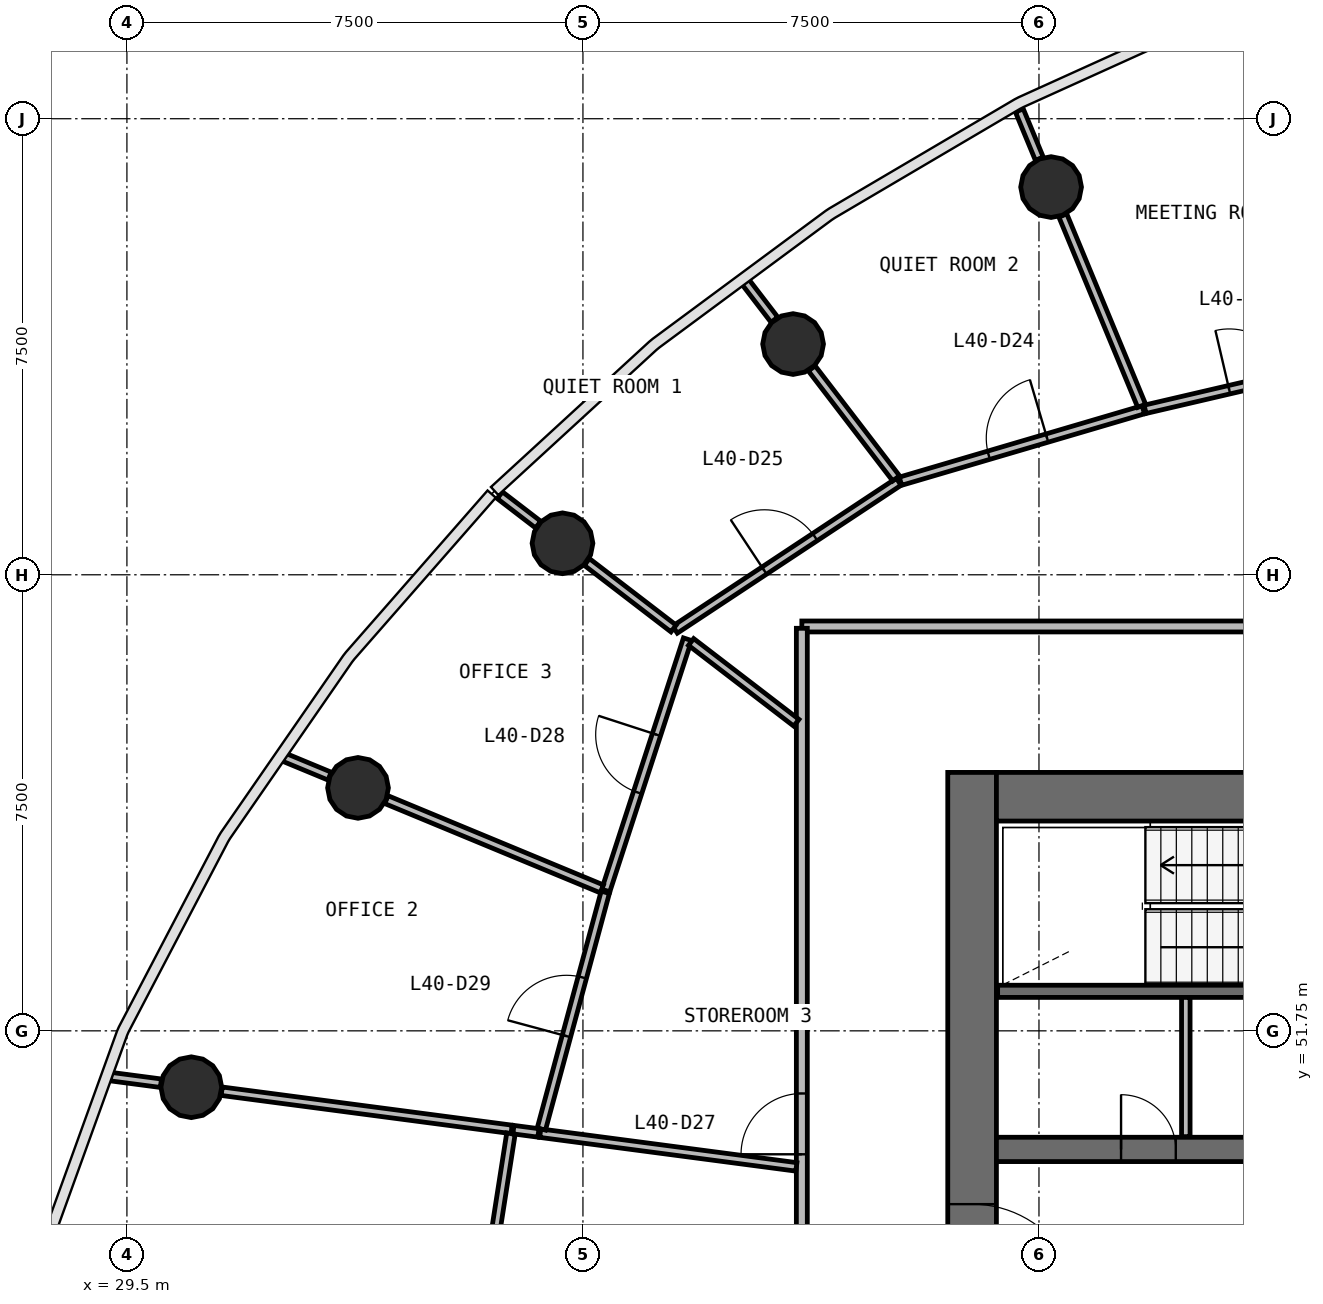
"""IFC4 building model, lengths in metres.
Left out: names, types, materials, properties, quantities, classifications, styles, units other than length and angle.
Written with IfcOpenShell. Run it as: python <this file> out.ifc"""

import sys

from ifc_helpers import new_model, si_unit, direction, frame, frame_2d, origin, origin_2d, place, context, subcontext, project, spatial, rectangle, circle, extrude, source, transform, mapped, element, fill, save


model = new_model("IFC4")
c1 = context("Model", 3, precision=1e-05, world=origin(), true_north=direction((0.0, 1.0)))
c2 = subcontext(c1, "Body", "Model", "MODEL_VIEW")
j1 = project(units=[si_unit("LENGTHUNIT", "METRE"), si_unit("PLANEANGLEUNIT", "RADIAN")], contexts=[c1])
p1 = place(None, origin())
s1 = spatial("IfcSite", under=j1, at=p1, CompositionType="ELEMENT")
p2 = place(p1, origin())
s2 = spatial("IfcBuilding", under=s1, at=p2, CompositionType="ELEMENT")
p3 = place(p2, frame((0.0, 0.0, 168.2)))
s3 = spatial("IfcBuildingStorey", under=s2, at=p3, CompositionType="ELEMENT", Elevation=168.2)
p4 = place(p3, frame((43.4, 56.0, 0.0), z_axis=(0.0, 0.0, 1.0), x_axis=(0.0, -1.0, 0.0)))
e1 = element("IfcWall", 1, at=p4, inside=s3, PredefinedType="SHEAR", context=c2, shape_type="SweptSolid", body=[
    extrude(rectangle(XDim=16.0, YDim=0.8, at=frame_2d((8.0, 0.0))), origin(), (0.0, 0.0, 1.0), 3.9),
])
p5 = place(p4, frame((7.1, 0.0, 0.0)))
e2 = element("IfcOpeningElement", 2, at=p5, cuts=e1, PredefinedType="OPENING", context=c2, shape_type="SweptSolid", body=[
    extrude(rectangle(XDim=1.8, YDim=2.1, at=frame_2d((0.9, 1.05))), frame((0.0, 0.41, 0.0), z_axis=(0.0, -1.0, 0.0), x_axis=(1.0, 0.0, 0.0)), (0.0, 0.0, 1.0), 0.82),
])
p6 = place(p3, frame((60.2, 55.6, 0.0), z_axis=(0.0, 0.0, 1.0), x_axis=(-1.0, 0.0, 0.0)))
e3 = element("IfcWall", 3, at=p6, inside=s3, PredefinedType="SHEAR", context=c2, shape_type="SweptSolid", body=[
    extrude(rectangle(XDim=16.4, YDim=0.8, at=frame_2d((8.2, 0.0))), origin(), (0.0, 0.0, 1.0), 3.9),
])
p7 = place(p6, frame((0.2, 0.0, 0.0)))
e4 = element("IfcOpeningElement", 4, at=p7, cuts=e3, PredefinedType="OPENING", context=c2, shape_type="SweptSolid", body=[
    extrude(rectangle(XDim=1.1, YDim=2.1, at=frame_2d((0.55, 1.05))), frame((0.0, 0.41, 0.0), z_axis=(0.0, -1.0, 0.0), x_axis=(1.0, 0.0, 0.0)), (0.0, 0.0, 1.0), 0.82),
])
p8 = place(p6, frame((10.1, 0.0, 0.0)))
e5 = element("IfcOpeningElement", 5, at=p8, cuts=e3, PredefinedType="OPENING", context=c2, shape_type="SweptSolid", body=[
    extrude(rectangle(XDim=1.2, YDim=2.1, at=frame_2d((0.6, 1.05))), frame((0.0, 0.41, 0.0), z_axis=(0.0, -1.0, 0.0), x_axis=(1.0, 0.0, 0.0)), (0.0, 0.0, 1.0), 0.82),
])
p9 = place(p6, frame((7.05, 0.0, 0.0)))
e6 = element("IfcOpeningElement", 6, at=p9, cuts=e3, PredefinedType="OPENING", context=c2, shape_type="SweptSolid", body=[
    extrude(rectangle(XDim=1.1, YDim=2.1, at=frame_2d((0.55, 1.05))), frame((0.0, 0.41, 0.0), z_axis=(0.0, -1.0, 0.0), x_axis=(1.0, 0.0, 0.0)), (0.0, 0.0, 1.0), 0.82),
])
p10 = place(p3, frame((43.8, 49.8, 0.0), z_axis=(0.0, 0.0, 1.0), x_axis=(1.0, 0.0, 0.0)))
e7 = element("IfcWall", 7, at=p10, inside=s3, PredefinedType="SHEAR", context=c2, shape_type="SweptSolid", body=[
    extrude(rectangle(XDim=16.4, YDim=0.4, at=frame_2d((8.2, 0.0))), origin(), (0.0, 0.0, 1.0), 3.9),
])
p11 = place(p10, frame((9.6, 0.0, 0.0)))
e8 = element("IfcOpeningElement", 8, at=p11, cuts=e7, PredefinedType="OPENING", context=c2, shape_type="SweptSolid", body=[
    extrude(rectangle(XDim=1.1, YDim=2.1, at=frame_2d((0.55, 1.05))), frame((0.0, 0.21, 0.0), z_axis=(0.0, -1.0, 0.0), x_axis=(1.0, 0.0, 0.0)), (0.0, 0.0, 1.0), 0.42),
])
p12 = place(p10, frame((12.1, 0.0, 0.0)))
e9 = element("IfcOpeningElement", 9, at=p12, cuts=e7, PredefinedType="OPENING", context=c2, shape_type="SweptSolid", body=[
    extrude(rectangle(XDim=1.1, YDim=2.1, at=frame_2d((0.55, 1.05))), frame((0.0, 0.21, 0.0), z_axis=(0.0, -1.0, 0.0), x_axis=(1.0, 0.0, 0.0)), (0.0, 0.0, 1.0), 0.42),
])
p13 = place(p10, frame((14.6, 0.0, 0.0)))
e10 = element("IfcOpeningElement", 10, at=p13, cuts=e7, PredefinedType="OPENING", context=c2, shape_type="SweptSolid", body=[
    extrude(rectangle(XDim=1.1, YDim=2.1, at=frame_2d((0.55, 1.05))), frame((0.0, 0.21, 0.0), z_axis=(0.0, -1.0, 0.0), x_axis=(1.0, 0.0, 0.0)), (0.0, 0.0, 1.0), 0.42),
])
p14 = place(p10, frame((2.05, 0.0, 0.0)))
e11 = element("IfcOpeningElement", 11, at=p14, cuts=e7, PredefinedType="OPENING", context=c2, shape_type="SweptSolid", body=[
    extrude(rectangle(XDim=0.9, YDim=2.1, at=frame_2d((0.45, 1.05))), frame((0.0, 0.21, 0.0), z_axis=(0.0, -1.0, 0.0), x_axis=(1.0, 0.0, 0.0)), (0.0, 0.0, 1.0), 0.42),
])
p15 = place(p10, frame((5.05, 0.0, 0.0)))
e12 = element("IfcOpeningElement", 12, at=p15, cuts=e7, PredefinedType="OPENING", context=c2, shape_type="SweptSolid", body=[
    extrude(rectangle(XDim=0.9, YDim=2.1, at=frame_2d((0.45, 1.05))), frame((0.0, 0.21, 0.0), z_axis=(0.0, -1.0, 0.0), x_axis=(1.0, 0.0, 0.0)), (0.0, 0.0, 1.0), 0.42),
])
p16 = place(p10, frame((7.65, 0.0, 0.0)))
e13 = element("IfcOpeningElement", 13, at=p16, cuts=e7, PredefinedType="OPENING", context=c2, shape_type="SweptSolid", body=[
    extrude(rectangle(XDim=0.9, YDim=2.1, at=frame_2d((0.45, 1.05))), frame((0.0, 0.21, 0.0), z_axis=(0.0, -1.0, 0.0), x_axis=(1.0, 0.0, 0.0)), (0.0, 0.0, 1.0), 0.42),
])
m1 = source(origin(), c2, "Body", "SweptSolid", [
    extrude(circle(Radius=0.5, at=origin_2d()), origin(), (0.0, 0.0, 1.0), 3.9),
])
for number, where, z_axis, x_axis in (
    (14, (44.699, 65.626, 0.0), (0.0, 0.0, 1.0), (1.0, 0.0, 0.0)),
    (15, (40.456, 63.044, 0.0), (0.0, 0.0, 1.0), (1.0, 0.0, 0.0)),
    (16, (36.664, 59.768, 0.0), (0.0, 0.0, 1.0), (1.0, 0.0, 0.0)),
    (17, (33.301, 55.746, 0.0), (0.0, 0.0, 1.0), (1.0, 0.0, 0.0)),
    (18, (30.559, 50.823, 0.0), (0.0, 0.0, 1.0), (1.0, 0.0, 0.0)),
):
    element("IfcColumn", number, at=place(p3, frame(where, z_axis=z_axis, x_axis=x_axis)), inside=s3, PredefinedType="COLUMN", context=c2, shape_type="MappedRepresentation", body=[
        mapped(m1, transform((0.0, 0.0, 0.0), scale=1.0)),
    ])
p17 = place(p3, frame((43.82, 52.4, 0.0), z_axis=(0.0, 0.0, 1.0), x_axis=(1.0, 0.0, 0.0)))
e19 = element("IfcWall", 19, at=p17, inside=s3, PredefinedType="SOLIDWALL", context=c2, shape_type="SweptSolid", body=[
    extrude(rectangle(XDim=6.58, YDim=0.2, at=frame_2d((3.29, 0.0))), origin(), (0.0, 0.0, 1.0), 3.58),
])
p18 = place(p3, frame((40.6, 58.4, 0.0), z_axis=(0.0, 0.0, 1.0), x_axis=(1.0, 0.0, 0.0)))
e20 = element("IfcWall", 20, at=p18, inside=s3, PredefinedType="PARTITIONING", context=c2, shape_type="SweptSolid", body=[
    extrude(rectangle(XDim=22.8, YDim=0.18, at=frame_2d((11.4, 0.0))), origin(), (0.0, 0.0, 1.0), 2.88),
])
p19 = place(p18, frame((16.05, 0.0, 0.0)))
e21 = element("IfcOpeningElement", 21, at=p19, cuts=e20, PredefinedType="OPENING", context=c2, shape_type="SweptSolid", body=[
    extrude(rectangle(XDim=0.9, YDim=2.1, at=frame_2d((0.45, 1.05))), frame((0.0, 0.1, 0.0), z_axis=(0.0, -1.0, 0.0), x_axis=(1.0, 0.0, 0.0)), (0.0, 0.0, 1.0), 0.2),
])
p20 = place(p18, frame((13.05, 0.0, 0.0)))
e22 = element("IfcOpeningElement", 22, at=p20, cuts=e20, PredefinedType="OPENING", context=c2, shape_type="SweptSolid", body=[
    extrude(rectangle(XDim=0.9, YDim=2.1, at=frame_2d((0.45, 1.05))), frame((0.0, 0.1, 0.0), z_axis=(0.0, -1.0, 0.0), x_axis=(1.0, 0.0, 0.0)), (0.0, 0.0, 1.0), 0.2),
])
p21 = place(p18, frame((10.95, 0.0, 0.0)))
e23 = element("IfcOpeningElement", 23, at=p21, cuts=e20, PredefinedType="OPENING", context=c2, shape_type="SweptSolid", body=[
    extrude(rectangle(XDim=1.0, YDim=2.1, at=frame_2d((0.5, 1.05))), frame((0.0, 0.1, 0.0), z_axis=(0.0, -1.0, 0.0), x_axis=(1.0, 0.0, 0.0)), (0.0, 0.0, 1.0), 0.2),
])
p22 = place(p18, frame((19.95, 0.0, 0.0)))
e24 = element("IfcOpeningElement", 24, at=p22, cuts=e20, PredefinedType="OPENING", context=c2, shape_type="SweptSolid", body=[
    extrude(rectangle(XDim=1.0, YDim=2.1, at=frame_2d((0.5, 1.05))), frame((0.0, 0.1, 0.0), z_axis=(0.0, -1.0, 0.0), x_axis=(1.0, 0.0, 0.0)), (0.0, 0.0, 1.0), 0.2),
])
p23 = place(p3, frame((40.6, 37.63, 0.0), z_axis=(0.0, 0.0, 1.0), x_axis=(0.0, 1.0, 0.0)))
e25 = element("IfcWall", 25, at=p23, inside=s3, PredefinedType="PARTITIONING", context=c2, shape_type="SweptSolid", body=[
    extrude(rectangle(XDim=20.74, YDim=0.18, at=frame_2d((10.37, 0.0))), origin(), (0.0, 0.0, 1.0), 2.88),
])
p24 = place(p23, frame((12.09, 0.0, 0.0)))
e26 = element("IfcOpeningElement", 26, at=p24, cuts=e25, PredefinedType="OPENING", context=c2, shape_type="SweptSolid", body=[
    extrude(rectangle(XDim=1.0, YDim=2.1, at=frame_2d((0.5, 1.05))), frame((0.0, 0.1, 0.0), z_axis=(0.0, -1.0, 0.0), x_axis=(1.0, 0.0, 0.0)), (0.0, 0.0, 1.0), 0.2),
])
p25 = place(p23, frame((9.89, 0.0, 0.0)))
e27 = element("IfcOpeningElement", 27, at=p25, cuts=e25, PredefinedType="OPENING", context=c2, shape_type="SweptSolid", body=[
    extrude(rectangle(XDim=1.0, YDim=2.1, at=frame_2d((0.5, 1.05))), frame((0.0, 0.1, 0.0), z_axis=(0.0, -1.0, 0.0), x_axis=(1.0, 0.0, 0.0)), (0.0, 0.0, 1.0), 0.2),
])
p26 = place(p3, frame((35.827, 50.129, 0.0), z_axis=(0.0, 0.0, 1.0), x_axis=(-0.991450839052, 0.130480779208, 0.0)))
e28 = element("IfcWall", 28, at=p26, inside=s3, PredefinedType="PARTITIONING", context=c2, shape_type="SweptSolid", body=[
    extrude(rectangle(XDim=4.809, YDim=0.14, at=frame_2d((2.404, 0.0))), origin(), (0.0, 0.0, 1.0), 2.88),
])
p27 = place(p3, frame((38.514, 58.348, 0.0), z_axis=(0.0, 0.0, 1.0), x_axis=(0.834249384929, 0.551387308292, 0.0)))
e29 = element("IfcWall", 29, at=p27, inside=s3, PredefinedType="PARTITIONING", context=c2, shape_type="SweptSolid", body=[
    extrude(rectangle(XDim=4.41, YDim=0.14, at=frame_2d((2.205, 0.0))), origin(), (0.0, 0.0, 1.0), 2.88),
])
p28 = place(p27, frame((1.76, 0.0, 0.0)))
e30 = element("IfcOpeningElement", 30, at=p28, cuts=e29, PredefinedType="OPENING", context=c2, shape_type="SweptSolid", body=[
    extrude(rectangle(XDim=1.0, YDim=2.1, at=frame_2d((0.5, 1.05))), frame((0.0, 0.08, 0.0), z_axis=(0.0, -1.0, 0.0), x_axis=(1.0, 0.0, 0.0)), (0.0, 0.0, 1.0), 0.16),
])
p29 = place(p3, frame((35.152, 45.811, 0.0), z_axis=(0.0, 0.0, 1.0), x_axis=(0.154356099054, 0.988015280593, 0.0)))
e31 = element("IfcWall", 31, at=p29, inside=s3, PredefinedType="PARTITIONING", context=c2, shape_type="SweptSolid", body=[
    extrude(rectangle(XDim=4.301, YDim=0.14, at=frame_2d((2.15, 0.0))), origin(), (0.0, 0.0, 1.0), 2.88),
])
p30 = place(p29, frame((1.651, 0.0, 0.0)))
e32 = element("IfcOpeningElement", 32, at=p30, cuts=e31, PredefinedType="OPENING", context=c2, shape_type="SweptSolid", body=[
    extrude(rectangle(XDim=1.0, YDim=2.1, at=frame_2d((0.5, 1.05))), frame((0.0, 0.08, 0.0), z_axis=(0.0, -1.0, 0.0), x_axis=(1.0, 0.0, 0.0)), (0.0, 0.0, 1.0), 0.16),
])
p31 = place(p3, frame((37.375, 54.058, 0.0), z_axis=(0.0, 0.0, 1.0), x_axis=(0.309393484324, 0.950934104898, 0.0)))
e33 = element("IfcWall", 33, at=p31, inside=s3, PredefinedType="PARTITIONING", context=c2, shape_type="SweptSolid", body=[
    extrude(rectangle(XDim=4.345, YDim=0.14, at=frame_2d((2.173, 0.0))), origin(), (0.0, 0.0, 1.0), 2.88),
])
p32 = place(p31, frame((1.696, 0.0, 0.0)))
e34 = element("IfcOpeningElement", 34, at=p32, cuts=e33, PredefinedType="OPENING", context=c2, shape_type="SweptSolid", body=[
    extrude(rectangle(XDim=1.0, YDim=2.1, at=frame_2d((0.5, 1.05))), frame((0.0, 0.08, 0.0), z_axis=(0.0, -1.0, 0.0), x_axis=(1.0, 0.0, 0.0)), (0.0, 0.0, 1.0), 0.16),
])
p33 = place(p3, frame((40.51, 49.513, 0.0), z_axis=(0.0, 0.0, 1.0), x_axis=(-0.991441382379, 0.13055261509, 0.0)))
e35 = element("IfcWall", 35, at=p33, inside=s3, PredefinedType="PARTITIONING", context=c2, shape_type="SweptSolid", body=[
    extrude(rectangle(XDim=4.249, YDim=0.14, at=frame_2d((2.125, 0.0))), origin(), (0.0, 0.0, 1.0), 2.88),
])
p34 = place(p3, frame((42.222, 60.789, 0.0), z_axis=(0.0, 0.0, 1.0), x_axis=(0.959320664993, 0.282318723638, 0.0)))
e36 = element("IfcWall", 36, at=p34, inside=s3, PredefinedType="PARTITIONING", context=c2, shape_type="SweptSolid", body=[
    extrude(rectangle(XDim=4.163, YDim=0.14, at=frame_2d((2.082, 0.0))), origin(), (0.0, 0.0, 1.0), 2.88),
])
p35 = place(p34, frame((1.513, 0.0, 0.0)))
e37 = element("IfcOpeningElement", 37, at=p35, cuts=e36, PredefinedType="OPENING", context=c2, shape_type="SweptSolid", body=[
    extrude(rectangle(XDim=1.0, YDim=2.1, at=frame_2d((0.5, 1.05))), frame((0.0, 0.08, 0.0), z_axis=(0.0, -1.0, 0.0), x_axis=(1.0, 0.0, 0.0)), (0.0, 0.0, 1.0), 0.16),
])
p36 = place(p3, frame((36.316, 50.135, 0.0), z_axis=(0.0, 0.0, 1.0), x_axis=(0.260683344338, 0.965424359536, 0.0)))
e38 = element("IfcWall", 38, at=p36, inside=s3, PredefinedType="PARTITIONING", context=c2, shape_type="SweptSolid", body=[
    extrude(rectangle(XDim=4.033, YDim=0.14, at=frame_2d((2.016, 0.0))), origin(), (0.0, 0.0, 1.0), 2.88),
])
p37 = place(p36, frame((1.583, 0.0, 0.0)))
e39 = element("IfcOpeningElement", 39, at=p37, cuts=e38, PredefinedType="OPENING", context=c2, shape_type="SweptSolid", body=[
    extrude(rectangle(XDim=1.0, YDim=2.1, at=frame_2d((0.5, 1.05))), frame((0.0, 0.08, 0.0), z_axis=(0.0, -1.0, 0.0), x_axis=(1.0, 0.0, 0.0)), (0.0, 0.0, 1.0), 0.16),
])
p38 = place(p3, frame((46.245, 61.971, 0.0), z_axis=(0.0, 0.0, 1.0), x_axis=(0.973895613849, 0.22699632888, 0.0)))
e40 = element("IfcWall", 40, at=p38, inside=s3, PredefinedType="PARTITIONING", context=c2, shape_type="SweptSolid", body=[
    extrude(rectangle(XDim=3.871, YDim=0.14, at=frame_2d((1.936, 0.0))), origin(), (0.0, 0.0, 1.0), 2.88),
])
p39 = place(p38, frame((1.421, 0.0, 0.0)))
e41 = element("IfcOpeningElement", 41, at=p39, cuts=e40, PredefinedType="OPENING", context=c2, shape_type="SweptSolid", body=[
    extrude(rectangle(XDim=1.0, YDim=2.1, at=frame_2d((0.5, 1.05))), frame((0.0, 0.08, 0.0), z_axis=(0.0, -1.0, 0.0), x_axis=(1.0, 0.0, 0.0)), (0.0, 0.0, 1.0), 0.16),
])
p40 = place(p3, frame((37.31, 54.085, 0.0), z_axis=(0.0, 0.0, 1.0), x_axis=(-0.923881045452, 0.382679779783, 0.0)))
e42 = element("IfcWall", 42, at=p40, inside=s3, PredefinedType="PARTITIONING", context=c2, shape_type="SweptSolid", body=[
    extrude(rectangle(XDim=3.835, YDim=0.14, at=frame_2d((1.917, 0.0))), origin(), (0.0, 0.0, 1.0), 2.88),
])
p41 = place(p3, frame((46.189, 62.029, 0.0), z_axis=(0.0, 0.0, 1.0), x_axis=(-0.382706061459, 0.923870158909, 0.0)))
e43 = element("IfcWall", 43, at=p41, inside=s3, PredefinedType="PARTITIONING", context=c2, shape_type="SweptSolid", body=[
    extrude(rectangle(XDim=3.388, YDim=0.14, at=frame_2d((1.694, 0.0))), origin(), (0.0, 0.0, 1.0), 2.88),
])
p42 = place(p3, frame((46.915, 50.01, 0.0), z_axis=(0.0, 0.0, 1.0), x_axis=(0.0, 1.0, 0.0)))
e44 = element("IfcWall", 44, at=p42, inside=s3, PredefinedType="PARTITIONING", context=c2, shape_type="SweptSolid", body=[
    extrude(rectangle(XDim=2.29, YDim=0.14, at=frame_2d((1.145, 0.0))), origin(), (0.0, 0.0, 1.0), 2.88),
])
p43 = place(p3, frame((40.51, 56.817, 0.0), z_axis=(0.0, 0.0, 1.0), x_axis=(-0.793401046591, 0.608699251904, 0.0)))
e45 = element("IfcWall", 45, at=p43, inside=s3, PredefinedType="PARTITIONING", context=c2, shape_type="SweptSolid", body=[
    extrude(rectangle(XDim=2.182, YDim=0.14, at=frame_2d((1.091, 0.0))), origin(), (0.0, 0.0, 1.0), 2.88),
])
p44 = place(p3, frame((42.151, 60.836, 0.0), z_axis=(0.0, 0.0, 1.0), x_axis=(-0.608721584344, 0.793383912588, 0.0)))
e46 = element("IfcWall", 46, at=p44, inside=s3, PredefinedType="PARTITIONING", context=c2, shape_type="SweptSolid", body=[
    extrude(rectangle(XDim=2.279, YDim=0.14, at=frame_2d((1.14, 0.0))), origin(), (0.0, 0.0, 1.0), 2.88),
])
p45 = place(p3, frame((38.49, 58.366, 0.0), z_axis=(0.0, 0.0, 1.0), x_axis=(-0.793284917906, 0.608850588422, 0.0)))
e47 = element("IfcWall", 47, at=p45, inside=s3, PredefinedType="PARTITIONING", context=c2, shape_type="SweptSolid", body=[
    extrude(rectangle(XDim=1.798, YDim=0.14, at=frame_2d((0.899, 0.0))), origin(), (0.0, 0.0, 1.0), 2.88),
])
p46 = place(p3, frame((44.506, 66.092, 0.0), z_axis=(0.0, 0.0, 1.0), x_axis=(-0.382636339827, 0.923899037473, 0.0)))
e48 = element("IfcWall", 48, at=p46, inside=s3, PredefinedType="PARTITIONING", context=c2, shape_type="SweptSolid", body=[
    extrude(rectangle(XDim=0.859, YDim=0.14, at=frame_2d((0.429, 0.0))), origin(), (0.0, 0.0, 1.0), 2.88),
])
p47 = place(p3, frame((30.059, 50.889, 0.0), z_axis=(0.0, 0.0, 1.0), x_axis=(-0.991457294924, 0.130431715243, 0.0)))
e49 = element("IfcWall", 49, at=p47, inside=s3, PredefinedType="PARTITIONING", context=c2, shape_type="SweptSolid", body=[
    extrude(rectangle(XDim=0.831, YDim=0.14, at=frame_2d((0.416, 0.0))), origin(), (0.0, 0.0, 1.0), 2.88),
])
p48 = place(p3, frame((32.834, 55.939, 0.0), z_axis=(0.0, 0.0, 1.0), x_axis=(-0.923837792571, 0.382784185955, 0.0)))
e50 = element("IfcWall", 50, at=p48, inside=s3, PredefinedType="PARTITIONING", context=c2, shape_type="SweptSolid", body=[
    extrude(rectangle(XDim=0.814, YDim=0.14, at=frame_2d((0.407, 0.0))), origin(), (0.0, 0.0, 1.0), 2.88),
])
p49 = place(p3, frame((36.263, 60.075, 0.0), z_axis=(0.0, 0.0, 1.0), x_axis=(-0.79338870093, 0.608715343355, 0.0)))
e51 = element("IfcWall", 51, at=p49, inside=s3, PredefinedType="PARTITIONING", context=c2, shape_type="SweptSolid", body=[
    extrude(rectangle(XDim=0.794, YDim=0.14, at=frame_2d((0.397, 0.0))), origin(), (0.0, 0.0, 1.0), 2.88),
])
p50 = place(p3, frame((40.149, 63.445, 0.0), z_axis=(0.0, 0.0, 1.0), x_axis=(-0.608868847335, 0.793270903755, 0.0)))
e52 = element("IfcWall", 52, at=p50, inside=s3, PredefinedType="PARTITIONING", context=c2, shape_type="SweptSolid", body=[
    extrude(rectangle(XDim=0.785, YDim=0.14, at=frame_2d((0.393, 0.0))), origin(), (0.0, 0.0, 1.0), 2.88),
])
p51 = place(p3, frame((36.268, 50.071, 0.0), z_axis=(0.0, 0.0, 1.0), x_axis=(-0.991508286842, 0.130043520114, 0.0)))
e53 = element("IfcWall", 53, at=p51, inside=s3, PredefinedType="PARTITIONING", context=c2, shape_type="SweptSolid", body=[
    extrude(rectangle(XDim=0.415, YDim=0.14, at=frame_2d((0.208, 0.0))), origin(), (0.0, 0.0, 1.0), 2.88),
])
m2 = source(origin(), c2, "Body", "SweptSolid", [
    extrude(rectangle(XDim=1.8, YDim=2.1, at=frame_2d((0.9, 1.05))), frame((0.0, 0.025, 0.0), z_axis=(0.0, -1.0, 0.0), x_axis=(1.0, 0.0, 0.0)), (0.0, 0.0, 1.0), 0.05),
])
p52 = place(p5, origin())
e54 = element("IfcDoor", 54, at=p52, inside=s3, OperationType="SINGLE_SWING_RIGHT", PredefinedType="DOOR", context=c2, shape_type="MappedRepresentation", body=[
    mapped(m2, transform((0.0, 0.0, 0.0), scale=1.0)),
])
fill(e2, e54)
m3 = source(origin(), c2, "Body", "SweptSolid", [
    extrude(rectangle(XDim=1.0, YDim=2.1, at=frame_2d((0.5, 1.05))), frame((0.0, 0.025, 0.0), z_axis=(0.0, -1.0, 0.0), x_axis=(1.0, 0.0, 0.0)), (0.0, 0.0, 1.0), 0.05),
])
p53 = place(p39, origin())
e55 = element("IfcDoor", 55, at=p53, inside=s3, OperationType="SINGLE_SWING_LEFT", PredefinedType="DOOR", context=c2, shape_type="MappedRepresentation", body=[
    mapped(m3, transform((0.0, 0.0, 0.0), scale=1.0)),
])
fill(e41, e55)
p54 = place(p35, origin())
e56 = element("IfcDoor", 56, at=p54, inside=s3, OperationType="SINGLE_SWING_RIGHT", PredefinedType="DOOR", context=c2, shape_type="MappedRepresentation", body=[
    mapped(m3, transform((0.0, 0.0, 0.0), scale=1.0)),
])
fill(e37, e56)
p55 = place(p28, origin())
e57 = element("IfcDoor", 57, at=p55, inside=s3, OperationType="SINGLE_SWING_LEFT", PredefinedType="DOOR", context=c2, shape_type="MappedRepresentation", body=[
    mapped(m3, transform((0.0, 0.0, 0.0), scale=1.0)),
])
fill(e30, e57)
p56 = place(p24, origin())
e58 = element("IfcDoor", 58, at=p56, inside=s3, OperationType="SINGLE_SWING_LEFT", PredefinedType="DOOR", context=c2, shape_type="MappedRepresentation", body=[
    mapped(m3, transform((0.0, 0.0, 0.0), scale=1.0)),
])
fill(e26, e58)
p57 = place(p32, origin())
e59 = element("IfcDoor", 59, at=p57, inside=s3, OperationType="SINGLE_SWING_RIGHT", PredefinedType="DOOR", context=c2, shape_type="MappedRepresentation", body=[
    mapped(m3, transform((0.0, 0.0, 0.0), scale=1.0)),
])
fill(e34, e59)
p58 = place(p37, origin())
e60 = element("IfcDoor", 60, at=p58, inside=s3, OperationType="SINGLE_SWING_LEFT", PredefinedType="DOOR", context=c2, shape_type="MappedRepresentation", body=[
    mapped(m3, transform((0.0, 0.0, 0.0), scale=1.0)),
])
fill(e39, e60)
m4 = source(origin(), c2, "Body", "SweptSolid", [
    extrude(rectangle(XDim=0.9, YDim=2.1, at=frame_2d((0.45, 1.05))), frame((0.0, 0.025, 0.0), z_axis=(0.0, -1.0, 0.0), x_axis=(1.0, 0.0, 0.0)), (0.0, 0.0, 1.0), 0.05),
])
p59 = place(p14, origin())
e61 = element("IfcDoor", 61, at=p59, inside=s3, OperationType="SINGLE_SWING_LEFT", PredefinedType="DOOR", context=c2, shape_type="MappedRepresentation", body=[
    mapped(m4, transform((0.0, 0.0, 0.0), scale=1.0)),
])
fill(e11, e61)
save(model, sys.argv[1])
